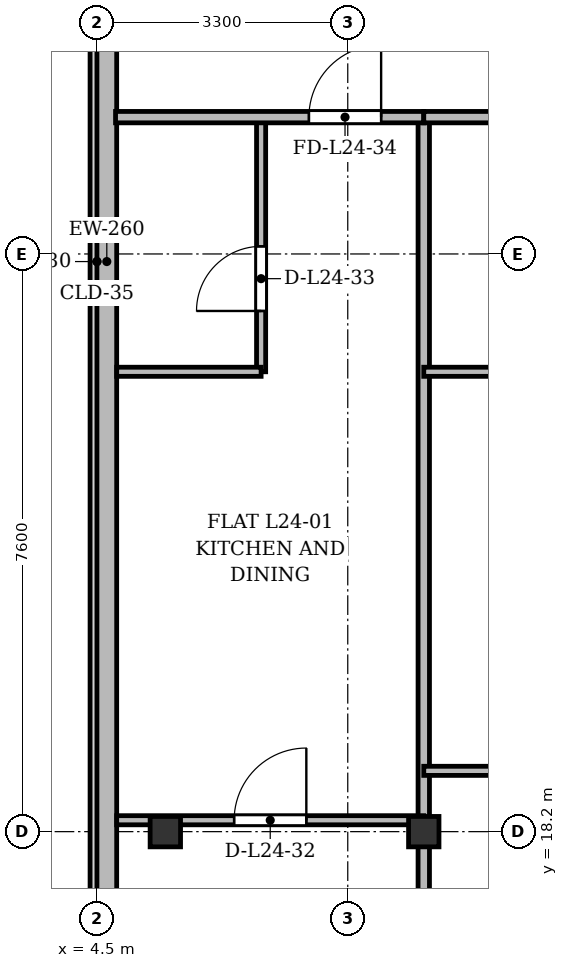
"""IFC4 building model, lengths in metres.
Left out: names, types, materials, properties, quantities, classifications, styles, units other than length and angle.
Written with IfcOpenShell. Run it as: python <this file> out.ifc"""

import sys

from ifc_helpers import new_model, si_unit, direction, frame, frame_2d, origin, origin_2d, place, context, subcontext, project, spatial, rectangle, i_section, extrude, source, transform, mapped, element, fill, save


model = new_model("IFC4")
c1 = context("Model", 3, precision=1e-05, world=origin(), true_north=direction((0.0, 1.0)))
c2 = subcontext(c1, "Body", "Model", "MODEL_VIEW")
j1 = project(units=[si_unit("LENGTHUNIT", "METRE"), si_unit("PLANEANGLEUNIT", "RADIAN")], contexts=[c1])
p1 = place(None, origin())
s1 = spatial("IfcSite", under=j1, at=p1, CompositionType="ELEMENT")
p2 = place(p1, origin())
s2 = spatial("IfcBuilding", under=s1, at=p2, CompositionType="ELEMENT")
p3 = place(p2, frame((0.0, 0.0, 96.1)))
s3 = spatial("IfcBuildingStorey", under=s2, at=p3, CompositionType="ELEMENT", Elevation=96.1)
m1 = source(origin(), c2, "Body", "SweptSolid", [
    extrude(i_section(OverallWidth=0.4, OverallDepth=0.4, WebThickness=0.022, FlangeThickness=0.035, at=origin_2d()), origin(), (0.0, 0.0, 1.0), 3.6),
])
for number, where, z_axis, x_axis in (
    (1, (5.4, 18.2, 0.0), (0.0, 0.0, 1.0), (1.0, 0.0, 0.0)),
    (2, (8.8, 18.2, 0.0), (0.0, 0.0, 1.0), (1.0, 0.0, 0.0)),
):
    element("IfcColumn", number, at=place(p3, frame(where, z_axis=z_axis, x_axis=x_axis)), inside=s3, PredefinedType="COLUMN", context=c2, shape_type="MappedRepresentation", body=[
        mapped(m1, transform((0.0, 0.0, 0.0), x_axis=(1.0, 0.0, 0.0), y_axis=(0.0, 1.0, 0.0), z_axis=(0.0, 0.0, 1.0), scale=1.0)),
    ])
p4 = place(p3, frame((4.63, 5.9, 0.0), z_axis=(0.0, 0.0, 1.0), x_axis=(0.0, 1.0, 0.0)))
e3 = element("IfcWall", 3, at=p4, inside=s3, PredefinedType="SOLIDWALL", context=c2, shape_type="SweptSolid", body=[
    extrude(rectangle(XDim=39.6, YDim=0.26, at=frame_2d((19.8, 0.0))), origin(), (0.0, 0.0, 1.0), 3.34),
])
p5 = place(p4, frame((1.45, 0.0, 0.92)))
e4 = element("IfcOpeningElement", 4, at=p5, cuts=e3, PredefinedType="OPENING", context=c2, shape_type="SweptSolid", body=[
    extrude(rectangle(XDim=1.2, YDim=1.65, at=frame_2d((0.6, 0.825))), frame((0.0, 0.14, 0.0), z_axis=(0.0, -1.0, 0.0), x_axis=(1.0, 0.0, 0.0)), (0.0, 0.0, 1.0), 0.28),
])
p6 = place(p4, frame((4.2, 0.0, 0.92)))
e5 = element("IfcOpeningElement", 5, at=p6, cuts=e3, PredefinedType="OPENING", context=c2, shape_type="SweptSolid", body=[
    extrude(rectangle(XDim=2.6, YDim=1.9, at=frame_2d((1.3, 0.95))), frame((0.0, 0.14, 0.0), z_axis=(0.0, -1.0, 0.0), x_axis=(1.0, 0.0, 0.0)), (0.0, 0.0, 1.0), 0.28),
])
p7 = place(p4, frame((8.4, 0.0, 0.92)))
e6 = element("IfcOpeningElement", 6, at=p7, cuts=e3, PredefinedType="OPENING", context=c2, shape_type="SweptSolid", body=[
    extrude(rectangle(XDim=2.6, YDim=1.9, at=frame_2d((1.3, 0.95))), frame((0.0, 0.14, 0.0), z_axis=(0.0, -1.0, 0.0), x_axis=(1.0, 0.0, 0.0)), (0.0, 0.0, 1.0), 0.28),
])
p8 = place(p4, frame((33.9, 0.0, 0.92)))
e7 = element("IfcOpeningElement", 7, at=p8, cuts=e3, PredefinedType="OPENING", context=c2, shape_type="SweptSolid", body=[
    extrude(rectangle(XDim=1.2, YDim=1.65, at=frame_2d((0.6, 0.825))), frame((0.0, 0.14, 0.0), z_axis=(0.0, -1.0, 0.0), x_axis=(1.0, 0.0, 0.0)), (0.0, 0.0, 1.0), 0.28),
])
p9 = place(p4, frame((37.25, 0.0, 0.92)))
e8 = element("IfcOpeningElement", 8, at=p9, cuts=e3, PredefinedType="OPENING", context=c2, shape_type="SweptSolid", body=[
    extrude(rectangle(XDim=1.2, YDim=1.65, at=frame_2d((0.6, 0.825))), frame((0.0, 0.14, 0.0), z_axis=(0.0, -1.0, 0.0), x_axis=(1.0, 0.0, 0.0)), (0.0, 0.0, 1.0), 0.28),
])
p10 = place(p3, frame((8.8, 3.145, 0.0), z_axis=(0.0, 0.0, 1.0), x_axis=(0.0, 1.0, 0.0)))
e9 = element("IfcWall", 9, at=p10, inside=s3, PredefinedType="PARTITIONING", context=c2, shape_type="SweptSolid", body=[
    extrude(rectangle(XDim=24.455, YDim=0.15, at=frame_2d((12.228, 0.0))), origin(), (0.0, 0.0, 1.0), 2.84),
])
p11 = place(p3, frame((4.76, 18.35, 0.0), z_axis=(0.0, 0.0, 1.0), x_axis=(1.0, 0.0, 0.0)))
e10 = element("IfcWall", 10, at=p11, inside=s3, PredefinedType="PARTITIONING", context=c2, shape_type="SweptSolid", body=[
    extrude(rectangle(XDim=4.04, YDim=0.12, at=frame_2d((2.02, 0.0))), origin(), (0.0, 0.0, 1.0), 2.752),
])
p12 = place(p11, frame((1.545, 0.0, 0.0)))
e11 = element("IfcOpeningElement", 11, at=p12, cuts=e10, PredefinedType="OPENING", context=c2, shape_type="SweptSolid", body=[
    extrude(rectangle(XDim=0.95, YDim=2.15, at=frame_2d((0.475, 1.075))), frame((0.0, 0.07, 0.0), z_axis=(0.0, -1.0, 0.0), x_axis=(1.0, 0.0, 0.0)), (0.0, 0.0, 1.0), 0.14),
])
p13 = place(p3, frame((6.66, 24.25, 0.0), z_axis=(0.0, 0.0, 1.0), x_axis=(0.0, 1.0, 0.0)))
e12 = element("IfcWall", 12, at=p13, inside=s3, PredefinedType="PARTITIONING", context=c2, shape_type="SweptSolid", body=[
    extrude(rectangle(XDim=3.35, YDim=0.12, at=frame_2d((1.675, 0.0))), origin(), (0.0, 0.0, 1.0), 2.99),
])
p14 = place(p13, frame((0.8, 0.0, 0.0)))
e13 = element("IfcOpeningElement", 13, at=p14, cuts=e12, PredefinedType="OPENING", context=c2, shape_type="SweptSolid", body=[
    extrude(rectangle(XDim=0.85, YDim=2.1, at=frame_2d((0.425, 1.05))), frame((0.0, 0.07, 0.0), z_axis=(0.0, -1.0, 0.0), x_axis=(1.0, 0.0, 0.0)), (0.0, 0.0, 1.0), 0.14),
])
p15 = place(p3, frame((4.76, 24.25, 0.0), z_axis=(0.0, 0.0, 1.0), x_axis=(1.0, 0.0, 0.0)))
e14 = element("IfcWall", 14, at=p15, inside=s3, PredefinedType="PARTITIONING", context=c2, shape_type="SweptSolid", body=[
    extrude(rectangle(XDim=1.9, YDim=0.12, at=frame_2d((0.95, 0.0))), origin(), (0.0, 0.0, 1.0), 2.84),
])
p16 = place(p3, frame((4.745, 27.6, 0.0), z_axis=(0.0, 0.0, 1.0), x_axis=(1.0, 0.0, 0.0)))
e15 = element("IfcWall", 15, at=p16, inside=s3, PredefinedType="PARTITIONING", context=c2, shape_type="SweptSolid", body=[
    extrude(rectangle(XDim=4.055, YDim=0.15, at=frame_2d((2.027, 0.0))), origin(), (0.0, 0.0, 1.0), 2.84),
])
p17 = place(p16, frame((2.544, 0.0, 0.0)))
e16 = element("IfcOpeningElement", 16, at=p17, cuts=e15, PredefinedType="OPENING", context=c2, shape_type="SweptSolid", body=[
    extrude(rectangle(XDim=0.95, YDim=2.15, at=frame_2d((0.475, 1.075))), frame((0.0, 0.085, 0.0), z_axis=(0.0, -1.0, 0.0), x_axis=(1.0, 0.0, 0.0)), (0.0, 0.0, 1.0), 0.17),
])
p18 = place(p3, frame((8.8, 19.0, 0.0), z_axis=(0.0, 0.0, 1.0), x_axis=(1.0, 0.0, 0.0)))
e17 = element("IfcWall", 17, at=p18, inside=s3, PredefinedType="PARTITIONING", context=c2, shape_type="SweptSolid", body=[
    extrude(rectangle(XDim=6.8, YDim=0.12, at=frame_2d((3.4, 0.0))), origin(), (0.0, 0.0, 1.0), 2.84),
])
p19 = place(p18, frame((2.925, 0.0, 0.0)))
e18 = element("IfcOpeningElement", 18, at=p19, cuts=e17, PredefinedType="OPENING", context=c2, shape_type="SweptSolid", body=[
    extrude(rectangle(XDim=0.95, YDim=2.15, at=frame_2d((0.475, 1.075))), frame((0.0, 0.07, 0.0), z_axis=(0.0, -1.0, 0.0), x_axis=(1.0, 0.0, 0.0)), (0.0, 0.0, 1.0), 0.14),
])
p20 = place(p3, frame((8.8, 24.25, 0.0), z_axis=(0.0, 0.0, 1.0), x_axis=(1.0, 0.0, 0.0)))
e19 = element("IfcWall", 19, at=p20, inside=s3, PredefinedType="PARTITIONING", context=c2, shape_type="SweptSolid", body=[
    extrude(rectangle(XDim=2.362, YDim=0.12, at=frame_2d((1.181, 0.0))), origin(), (0.0, 0.0, 1.0), 2.84),
])
p21 = place(p3, frame((8.8, 27.6, 0.0), z_axis=(0.0, 0.0, 1.0), x_axis=(1.0, 0.0, 0.0)))
e20 = element("IfcWall", 20, at=p21, inside=s3, PredefinedType="PARTITIONING", context=c2, shape_type="SweptSolid", body=[
    extrude(rectangle(XDim=6.8, YDim=0.15, at=frame_2d((3.4, 0.0))), origin(), (0.0, 0.0, 1.0), 2.84),
])
p22 = place(p21, frame((4.49, 0.0, 0.0)))
e21 = element("IfcOpeningElement", 21, at=p22, cuts=e20, PredefinedType="OPENING", context=c2, shape_type="SweptSolid", body=[
    extrude(rectangle(XDim=0.95, YDim=2.15, at=frame_2d((0.475, 1.075))), frame((0.0, 0.085, 0.0), z_axis=(0.0, -1.0, 0.0), x_axis=(1.0, 0.0, 0.0)), (0.0, 0.0, 1.0), 0.17),
])
m2 = source(origin(), c2, "Body", "SweptSolid", [
    extrude(rectangle(XDim=0.95, YDim=2.15, at=frame_2d((0.475, 1.075))), frame((0.0, 0.025, 0.0), z_axis=(0.0, -1.0, 0.0), x_axis=(1.0, 0.0, 0.0)), (0.0, 0.0, 1.0), 0.05),
])
p23 = place(p12, origin())
e22 = element("IfcDoor", 22, at=p23, inside=s3, OperationType="SINGLE_SWING_RIGHT", PredefinedType="DOOR", context=c2, shape_type="MappedRepresentation", body=[
    mapped(m2, transform((0.0, 0.0, 0.0), x_axis=(1.0, 0.0, 0.0), y_axis=(0.0, 1.0, 0.0), z_axis=(0.0, 0.0, 1.0), scale=1.0)),
])
fill(e11, e22)
m3 = source(origin(), c2, "Body", "SweptSolid", [
    extrude(rectangle(XDim=0.85, YDim=2.1, at=frame_2d((0.425, 1.05))), frame((0.0, 0.025, 0.0), z_axis=(0.0, -1.0, 0.0), x_axis=(1.0, 0.0, 0.0)), (0.0, 0.0, 1.0), 0.05),
])
p24 = place(p14, origin())
e23 = element("IfcDoor", 23, at=p24, inside=s3, OperationType="SINGLE_SWING_LEFT", PredefinedType="DOOR", context=c2, shape_type="MappedRepresentation", body=[
    mapped(m3, transform((0.0, 0.0, 0.0), x_axis=(1.0, 0.0, 0.0), y_axis=(0.0, 1.0, 0.0), z_axis=(0.0, 0.0, 1.0), scale=1.0)),
])
fill(e13, e23)
p25 = place(p17, origin())
e24 = element("IfcDoor", 24, at=p25, inside=s3, OperationType="SINGLE_SWING_RIGHT", PredefinedType="DOOR", context=c2, shape_type="MappedRepresentation", body=[
    mapped(m2, transform((0.0, 0.0, 0.0), x_axis=(1.0, 0.0, 0.0), y_axis=(0.0, 1.0, 0.0), z_axis=(0.0, 0.0, 1.0), scale=1.0)),
])
fill(e16, e24)
save(model, sys.argv[1])
